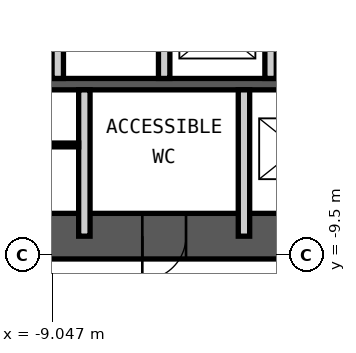
"""IFC4 building model, lengths in metres.
Left out: names, types, materials, properties, quantities, classifications, styles, units other than length and angle.
Written with IfcOpenShell. Run it as: python <this file> out.ifc"""

import sys

from ifc_helpers import new_model, si_unit, direction, frame, frame_2d, origin, place, context, subcontext, project, spatial, rectangle, extrude, element, fill, save


model = new_model("IFC4")
c1 = context("Model", 3, precision=1e-05, world=origin(), true_north=direction((0.0, 1.0)))
c2 = subcontext(c1, "Body", "Model", "MODEL_VIEW")
j1 = project(units=[si_unit("LENGTHUNIT", "METRE"), si_unit("PLANEANGLEUNIT", "RADIAN")], contexts=[c1])
p1 = place(None, origin())
s1 = spatial("IfcSite", under=j1, at=p1, CompositionType="ELEMENT")
p2 = place(p1, origin())
s2 = spatial("IfcBuilding", under=s1, at=p2, CompositionType="ELEMENT")
p3 = place(p2, frame((0.0, 0.0, 180.4)))
s3 = spatial("IfcBuildingStorey", under=s2, at=p3, CompositionType="ELEMENT", Elevation=180.4)
p4 = place(p3, frame((-12.0, -9.0, 0.0), z_axis=(0.0, 0.0, 1.0), x_axis=(1.0, 0.0, 0.0)))
e1 = element("IfcWall", 1, at=p4, inside=s3, PredefinedType="SHEAR", context=c2, shape_type="SweptSolid", body=[
    extrude(rectangle(XDim=24.0, YDim=1.2, at=frame_2d((12.0, 0.0))), origin(), (0.0, 0.0, 1.0), 4.2),
])
p5 = place(p4, frame((1.35, 0.0, 0.0)))
e2 = element("IfcOpeningElement", 2, at=p5, cuts=e1, PredefinedType="OPENING", context=c2, shape_type="SweptSolid", body=[
    extrude(rectangle(XDim=1.0, YDim=2.1, at=frame_2d((0.5, 1.05))), frame((0.0, 0.61, 0.0), z_axis=(0.0, -1.0, 0.0), x_axis=(1.0, 0.0, 0.0)), (0.0, 0.0, 1.0), 1.22),
])
p6 = place(p4, frame((5.325, 0.0, 0.0)))
e3 = element("IfcOpeningElement", 3, at=p6, cuts=e1, PredefinedType="OPENING", context=c2, shape_type="SweptSolid", body=[
    extrude(rectangle(XDim=1.15, YDim=2.1, at=frame_2d((0.575, 1.05))), frame((0.0, 0.61, 0.0), z_axis=(0.0, -1.0, 0.0), x_axis=(1.0, 0.0, 0.0)), (0.0, 0.0, 1.0), 1.22),
])
p7 = place(p4, frame((12.6, 0.0, 0.0)))
e4 = element("IfcOpeningElement", 4, at=p7, cuts=e1, PredefinedType="OPENING", context=c2, shape_type="SweptSolid", body=[
    extrude(rectangle(XDim=1.0, YDim=2.1, at=frame_2d((0.5, 1.05))), frame((0.0, 0.61, 0.0), z_axis=(0.0, -1.0, 0.0), x_axis=(1.0, 0.0, 0.0)), (0.0, 0.0, 1.0), 1.22),
])
p8 = place(p3, frame((-12.0, -5.0, 0.0), z_axis=(0.0, 0.0, 1.0), x_axis=(1.0, 0.0, 0.0)))
e5 = element("IfcWall", 5, at=p8, inside=s3, PredefinedType="SHEAR", context=c2, shape_type="SweptSolid", body=[
    extrude(rectangle(XDim=24.0, YDim=0.3, at=frame_2d((12.0, 0.0))), origin(), (0.0, 0.0, 1.0), 4.2),
])
for number, where, z_axis, x_axis in (
    (6, (-8.9, -4.85, 0.0), (0.0, 0.0, 1.0), (0.0, 1.0, 0.0)),
    (7, (-6.1, -4.85, 0.0), (0.0, 0.0, 1.0), (0.0, 1.0, 0.0)),
    (8, (-3.3, -4.85, 0.0), (0.0, 0.0, 1.0), (0.0, 1.0, 0.0)),
):
    element("IfcWall", number, at=place(p3, frame(where, z_axis=z_axis, x_axis=x_axis)), inside=s3, PredefinedType="PARTITIONING", context=c2, shape_type="SweptSolid", body=[
        extrude(rectangle(XDim=2.65, YDim=0.3, at=frame_2d((1.325, 0.0))), origin(), (0.0, 0.0, 1.0), 3.98),
    ])
for number, where, z_axis, x_axis in (
    (9, (-8.2, -9.0, 0.0), (0.0, 0.0, 1.0), (0.0, 1.0, 0.0)),
    (10, (-4.0, -9.0, 0.0), (0.0, 0.0, 1.0), (0.0, 1.0, 0.0)),
):
    element("IfcWall", number, at=place(p3, frame(where, z_axis=z_axis, x_axis=x_axis)), inside=s3, PredefinedType="PARTITIONING", context=c2, shape_type="SweptSolid", body=[
        extrude(rectangle(XDim=3.85, YDim=0.3, at=frame_2d((1.925, 0.0))), origin(), (0.0, 0.0, 1.0), 3.98),
    ])
p9 = place(p3, frame((-11.4, -6.6, 0.0), z_axis=(0.0, 0.0, 1.0), x_axis=(1.0, 0.0, 0.0)))
e11 = element("IfcWall", 11, at=p9, inside=s3, PredefinedType="PARTITIONING", context=c2, shape_type="SweptSolid", body=[
    extrude(rectangle(XDim=3.05, YDim=0.1, at=frame_2d((1.525, 0.0))), origin(), (0.0, 0.0, 1.0), 3.98),
])
p10 = place(p9, frame((0.1, 0.0, 0.0)))
e12 = element("IfcOpeningElement", 12, at=p10, cuts=e11, PredefinedType="OPENING", context=c2, shape_type="SweptSolid", body=[
    extrude(rectangle(XDim=1.0, YDim=2.4, at=frame_2d((0.5, 1.2))), frame((0.0, 0.06, 0.0), z_axis=(0.0, -1.0, 0.0), x_axis=(1.0, 0.0, 0.0)), (0.0, 0.0, 1.0), 0.12),
])
p11 = place(p6, origin())
e13 = element("IfcDoor", 13, at=p11, inside=s3, OperationType="SINGLE_SWING_LEFT", PredefinedType="DOOR", context=c2, shape_type="SweptSolid", body=[
    extrude(rectangle(XDim=1.15, YDim=2.1, at=frame_2d((0.575, 1.05))), frame((0.0, 0.025, 0.0), z_axis=(0.0, -1.0, 0.0), x_axis=(1.0, 0.0, 0.0)), (0.0, 0.0, 1.0), 0.05),
])
fill(e3, e13)
save(model, sys.argv[1])
